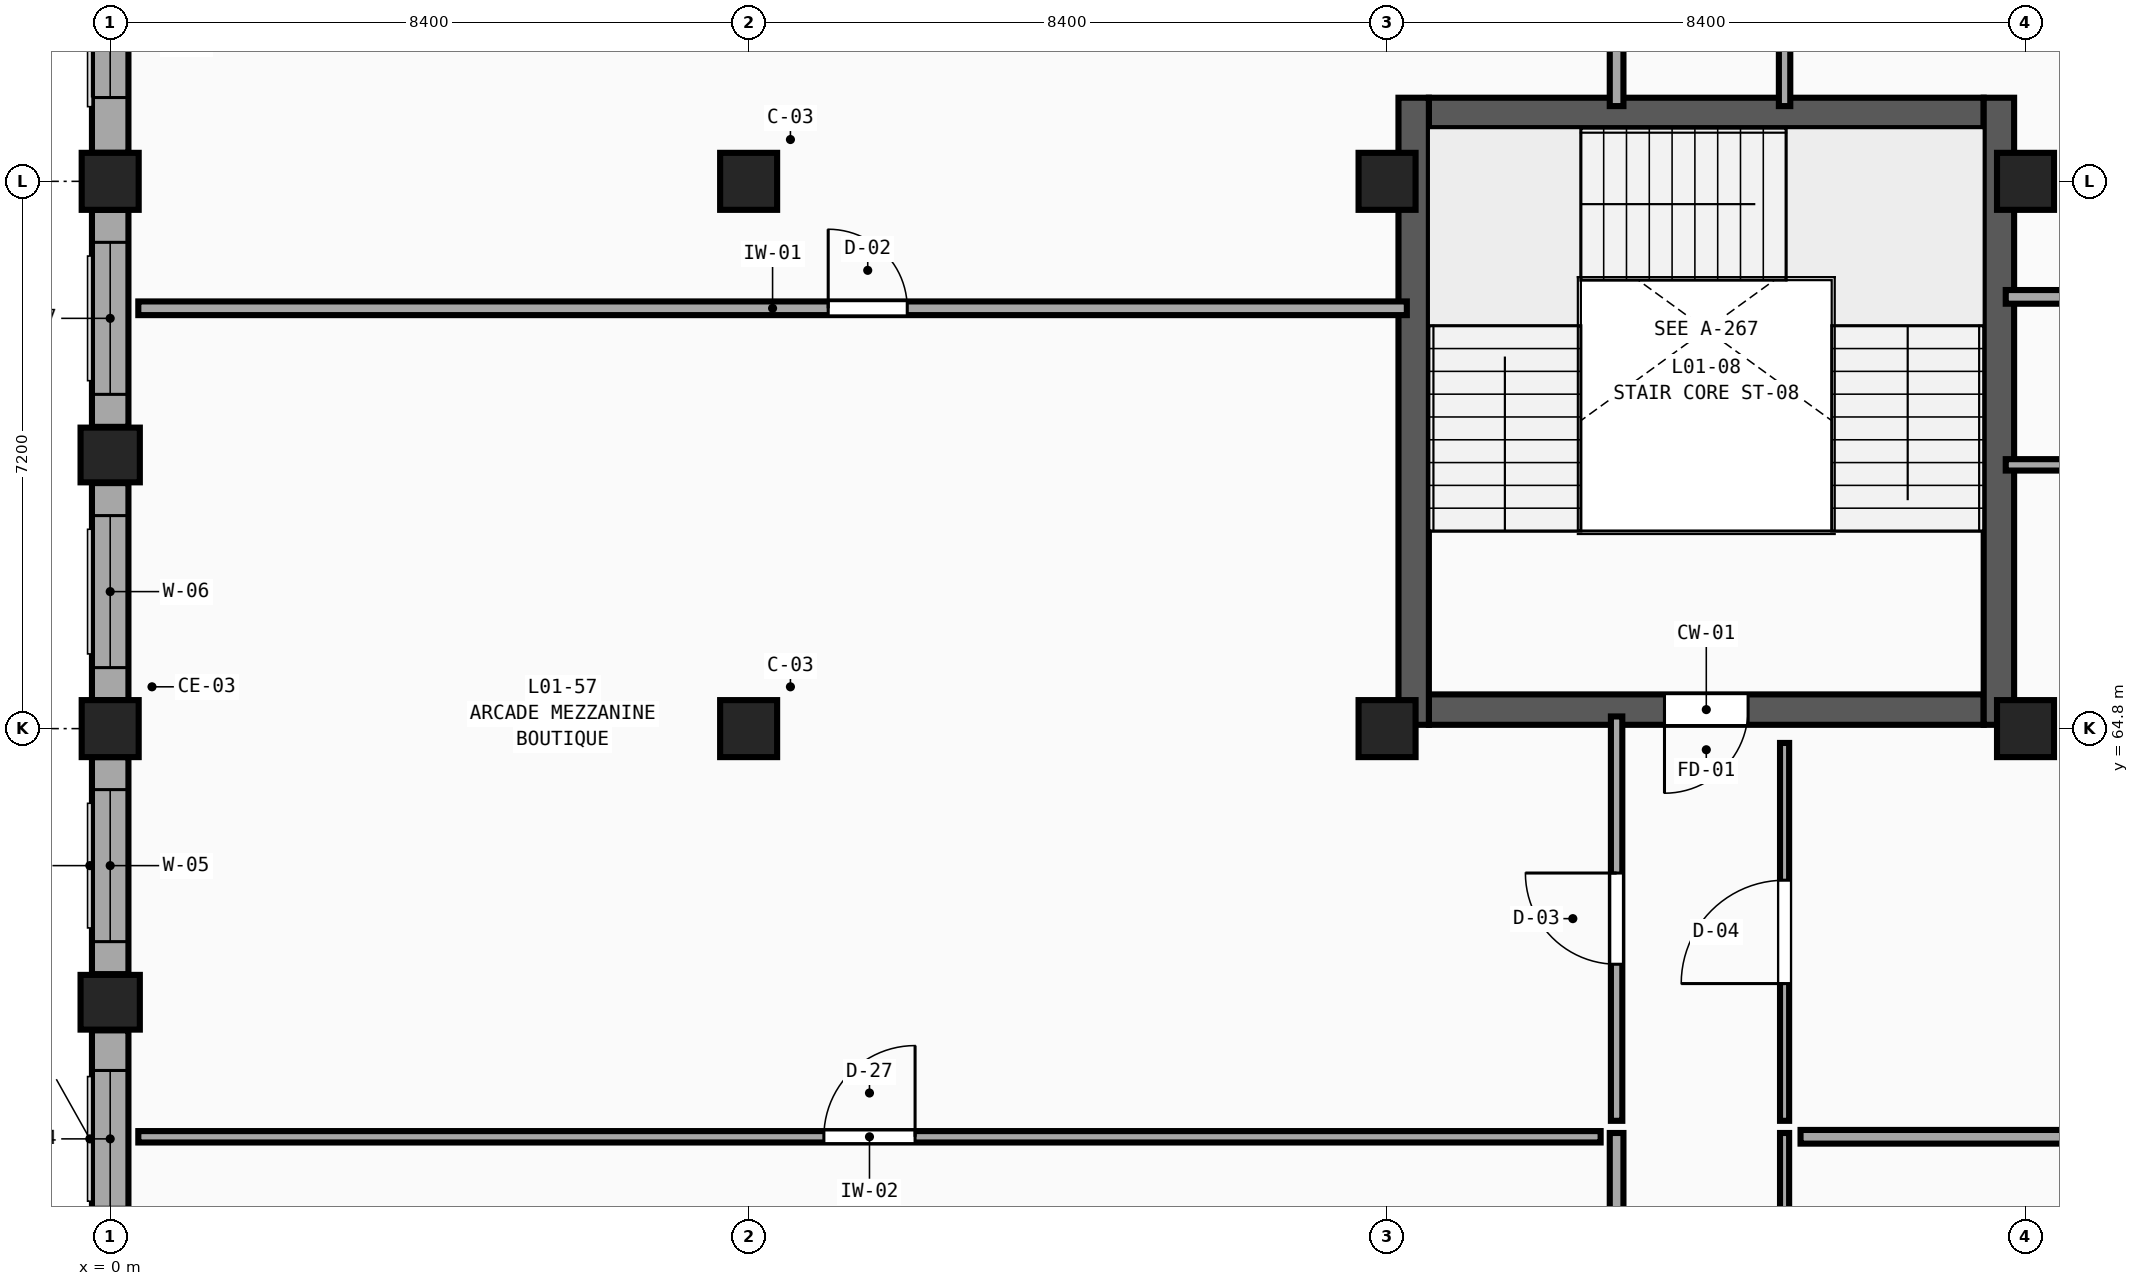
"""IFC4 building model, lengths in metres.
Left out: names, types, materials, properties, quantities, classifications, styles, units other than length and angle.
Written with IfcOpenShell. Run it as: python <this file> out.ifc"""

import sys

from ifc_helpers import new_model, si_unit, direction, frame, frame_2d, origin, origin_2d, place, context, subcontext, project, spatial, rectangle, extrude, element, fill, save


model = new_model("IFC4")
c1 = context("Model", 3, precision=1e-05, world=origin(), true_north=direction((0.0, 1.0)))
c2 = subcontext(c1, "Body", "Model", "MODEL_VIEW")
j1 = project(units=[si_unit("LENGTHUNIT", "METRE"), si_unit("PLANEANGLEUNIT", "RADIAN")], contexts=[c1])
p1 = place(None, origin())
s1 = spatial("IfcSite", under=j1, at=p1, CompositionType="ELEMENT")
p2 = place(p1, origin())
s2 = spatial("IfcBuilding", under=s1, at=p2, CompositionType="ELEMENT")
p3 = place(p2, frame((0.0, 0.0, 5.4)))
s3 = spatial("IfcBuildingStorey", under=s2, at=p3, CompositionType="ELEMENT", Elevation=5.4)
for number, where, z_axis, x_axis in (
    (1, (0.0, 64.8, 0.0), (0.0, 0.0, 1.0), (1.0, 0.0, 0.0)),
    (2, (0.0, 72.0, 0.0), (0.0, 0.0, 1.0), (1.0, 0.0, 0.0)),
    (3, (8.4, 64.8, 0.0), (0.0, 0.0, 1.0), (1.0, 0.0, 0.0)),
    (4, (8.4, 72.0, 0.0), (0.0, 0.0, 1.0), (1.0, 0.0, 0.0)),
    (5, (16.8, 64.8, 0.0), (0.0, 0.0, 1.0), (1.0, 0.0, 0.0)),
    (6, (16.8, 72.0, 0.0), (0.0, 0.0, 1.0), (1.0, 0.0, 0.0)),
    (7, (25.2, 64.8, 0.0), (0.0, 0.0, 1.0), (1.0, 0.0, 0.0)),
    (8, (25.2, 72.0, 0.0), (0.0, 0.0, 1.0), (1.0, 0.0, 0.0)),
):
    element("IfcColumn", number, at=place(p3, frame(where, z_axis=z_axis, x_axis=x_axis)), inside=s3, PredefinedType="COLUMN", context=c2, shape_type="SweptSolid", body=[
        extrude(rectangle(XDim=0.75, YDim=0.75, at=origin_2d()), origin(), (0.0, 0.0, 1.0), 4.5),
    ])
for number, where, z_axis, x_axis in (
    (9, (0.0, 61.2, 0.0), (0.0, 0.0, 1.0), (1.0, 0.0, 0.0)),
    (10, (0.0, 68.4, 0.0), (0.0, 0.0, 1.0), (1.0, 0.0, 0.0)),
):
    element("IfcColumn", number, at=place(p3, frame(where, z_axis=z_axis, x_axis=x_axis)), inside=s3, PredefinedType="PILASTER", context=c2, shape_type="SweptSolid", body=[
        extrude(rectangle(XDim=0.78, YDim=0.72, at=origin_2d()), origin(), (0.0, 0.0, 1.0), 4.5),
    ])
p4 = place(p3, frame((0.0, 57.975, 0.0), z_axis=(0.0, 0.0, 1.0), x_axis=(0.0, 1.0, 0.0)))
e11 = element("IfcWall", 11, at=p4, inside=s3, PredefinedType="SOLIDWALL", context=c2, shape_type="SweptSolid", body=[
    extrude(rectangle(XDim=2.855, YDim=0.48, at=frame_2d((1.427, 0.0))), origin(), (0.0, 0.0, 1.0), 3.63),
])
p5 = place(p4, frame((0.528, 0.0, 0.75)))
e12 = element("IfcOpeningElement", 12, at=p5, cuts=e11, PredefinedType="OPENING", context=c2, shape_type="SweptSolid", body=[
    extrude(rectangle(XDim=1.8, YDim=1.9, at=frame_2d((0.9, 0.95))), frame((0.0, 0.26, 0.0), z_axis=(0.0, -1.0, 0.0), x_axis=(1.0, 0.0, 0.0)), (0.0, 0.0, 1.0), 0.52),
])
p6 = place(p3, frame((0.0, 61.57, 0.0), z_axis=(0.0, 0.0, 1.0), x_axis=(0.0, 1.0, 0.0)))
e13 = element("IfcWall", 13, at=p6, inside=s3, PredefinedType="SOLIDWALL", context=c2, shape_type="SweptSolid", body=[
    extrude(rectangle(XDim=2.855, YDim=0.48, at=frame_2d((1.427, 0.0))), origin(), (0.0, 0.0, 1.0), 3.63),
])
p7 = place(p6, frame((0.427, 0.0, 0.75)))
e14 = element("IfcOpeningElement", 14, at=p7, cuts=e13, PredefinedType="OPENING", context=c2, shape_type="SweptSolid", body=[
    extrude(rectangle(XDim=2.0, YDim=1.9, at=frame_2d((1.0, 0.95))), frame((0.0, 0.26, 0.0), z_axis=(0.0, -1.0, 0.0), x_axis=(1.0, 0.0, 0.0)), (0.0, 0.0, 1.0), 0.52),
])
p8 = place(p3, frame((0.0, 65.175, 0.0), z_axis=(0.0, 0.0, 1.0), x_axis=(0.0, 1.0, 0.0)))
e15 = element("IfcWall", 15, at=p8, inside=s3, PredefinedType="SOLIDWALL", context=c2, shape_type="SweptSolid", body=[
    extrude(rectangle(XDim=2.855, YDim=0.48, at=frame_2d((1.427, 0.0))), origin(), (0.0, 0.0, 1.0), 3.63),
])
p9 = place(p8, frame((0.427, 0.0, 0.75)))
e16 = element("IfcOpeningElement", 16, at=p9, cuts=e15, PredefinedType="OPENING", context=c2, shape_type="SweptSolid", body=[
    extrude(rectangle(XDim=2.0, YDim=1.9, at=frame_2d((1.0, 0.95))), frame((0.0, 0.26, 0.0), z_axis=(0.0, -1.0, 0.0), x_axis=(1.0, 0.0, 0.0)), (0.0, 0.0, 1.0), 0.52),
])
p10 = place(p3, frame((0.0, 68.77, 0.0), z_axis=(0.0, 0.0, 1.0), x_axis=(0.0, 1.0, 0.0)))
e17 = element("IfcWall", 17, at=p10, inside=s3, PredefinedType="SOLIDWALL", context=c2, shape_type="SweptSolid", body=[
    extrude(rectangle(XDim=2.855, YDim=0.48, at=frame_2d((1.427, 0.0))), origin(), (0.0, 0.0, 1.0), 3.63),
])
p11 = place(p10, frame((0.427, 0.0, 0.75)))
e18 = element("IfcOpeningElement", 18, at=p11, cuts=e17, PredefinedType="OPENING", context=c2, shape_type="SweptSolid", body=[
    extrude(rectangle(XDim=2.0, YDim=1.9, at=frame_2d((1.0, 0.95))), frame((0.0, 0.26, 0.0), z_axis=(0.0, -1.0, 0.0), x_axis=(1.0, 0.0, 0.0)), (0.0, 0.0, 1.0), 0.52),
])
p12 = place(p3, frame((0.0, 72.375, 0.0), z_axis=(0.0, 0.0, 1.0), x_axis=(0.0, 1.0, 0.0)))
e19 = element("IfcWall", 19, at=p12, inside=s3, PredefinedType="SOLIDWALL", context=c2, shape_type="SweptSolid", body=[
    extrude(rectangle(XDim=2.855, YDim=0.48, at=frame_2d((1.427, 0.0))), origin(), (0.0, 0.0, 1.0), 3.63),
])
p13 = place(p12, frame((0.728, 0.0, 0.75)))
e20 = element("IfcOpeningElement", 20, at=p13, cuts=e19, PredefinedType="OPENING", context=c2, shape_type="SweptSolid", body=[
    extrude(rectangle(XDim=1.4, YDim=2.08, at=frame_2d((0.7, 1.04))), frame((0.0, 0.26, 0.0), z_axis=(0.0, -1.0, 0.0), x_axis=(1.0, 0.0, 0.0)), (0.0, 0.0, 1.0), 0.52),
])
p14 = place(p3, frame((24.65, 65.05, 0.0), z_axis=(0.0, 0.0, 1.0), x_axis=(-1.0, 0.0, 0.0)))
e21 = element("IfcWall", 21, at=p14, inside=s3, PredefinedType="SHEAR", context=c2, shape_type="SweptSolid", body=[
    extrude(rectangle(XDim=7.3, YDim=0.4, at=frame_2d((3.65, 0.0))), origin(), (0.0, 0.0, 1.0), 4.5),
])
p15 = place(p14, frame((3.1, 0.0, 0.0)))
e22 = element("IfcOpeningElement", 22, at=p15, cuts=e21, PredefinedType="OPENING", context=c2, shape_type="SweptSolid", body=[
    extrude(rectangle(XDim=1.1, YDim=2.2, at=frame_2d((0.55, 1.1))), frame((0.0, 0.22, 0.0), z_axis=(0.0, -1.0, 0.0), x_axis=(1.0, 0.0, 0.0)), (0.0, 0.0, 1.0), 0.44),
])
p16 = place(p3, frame((17.35, 72.9, 0.0), z_axis=(0.0, 0.0, 1.0), x_axis=(1.0, 0.0, 0.0)))
e23 = element("IfcWall", 23, at=p16, inside=s3, PredefinedType="SHEAR", context=c2, shape_type="SweptSolid", body=[
    extrude(rectangle(XDim=7.3, YDim=0.4, at=frame_2d((3.65, 0.0))), origin(), (0.0, 0.0, 1.0), 4.5),
])
for number, where, z_axis, x_axis in (
    (24, (17.15, 73.1, 0.0), (0.0, 0.0, 1.0), (0.0, -1.0, 0.0)),
    (25, (24.85, 64.85, 0.0), (0.0, 0.0, 1.0), (0.0, 1.0, 0.0)),
):
    element("IfcWall", number, at=place(p3, frame(where, z_axis=z_axis, x_axis=x_axis)), inside=s3, PredefinedType="SHEAR", context=c2, shape_type="SweptSolid", body=[
        extrude(rectangle(XDim=8.25, YDim=0.4, at=frame_2d((4.125, 0.0))), origin(), (0.0, 0.0, 1.0), 4.5),
    ])
p17 = place(p3, frame((0.37, 59.43, 0.0), z_axis=(0.0, 0.0, 1.0), x_axis=(1.0, 0.0, 0.0)))
e26 = element("IfcWall", 26, at=p17, inside=s3, PredefinedType="PARTITIONING", context=c2, shape_type="SweptSolid", body=[
    extrude(rectangle(XDim=19.24, YDim=0.15, at=frame_2d((9.62, 0.0))), origin(), (0.0, 0.0, 1.0), 4.18),
])
p18 = place(p17, frame((9.02, 0.0, 0.0)))
e27 = element("IfcOpeningElement", 27, at=p18, cuts=e26, PredefinedType="OPENING", context=c2, shape_type="SweptSolid", body=[
    extrude(rectangle(XDim=1.2, YDim=2.37, at=frame_2d((0.6, 1.185))), frame((0.0, 0.095, 0.0), z_axis=(0.0, -1.0, 0.0), x_axis=(1.0, 0.0, 0.0)), (0.0, 0.0, 1.0), 0.19),
])
p19 = place(p3, frame((0.37, 70.33, 0.0), z_axis=(0.0, 0.0, 1.0), x_axis=(1.0, 0.0, 0.0)))
e28 = element("IfcWall", 28, at=p19, inside=s3, PredefinedType="PARTITIONING", context=c2, shape_type="SweptSolid", body=[
    extrude(rectangle(XDim=16.69, YDim=0.18, at=frame_2d((8.345, 0.0))), origin(), (0.0, 0.0, 1.0), 4.18),
])
p20 = place(p19, frame((9.077, 0.0, 0.0)))
e29 = element("IfcOpeningElement", 29, at=p20, cuts=e28, PredefinedType="OPENING", context=c2, shape_type="SweptSolid", body=[
    extrude(rectangle(XDim=1.04, YDim=2.05, at=frame_2d((0.52, 1.025))), frame((0.0, 0.11, 0.0), z_axis=(0.0, -1.0, 0.0), x_axis=(1.0, 0.0, 0.0)), (0.0, 0.0, 1.0), 0.22),
])
p21 = place(p3, frame((19.82, 45.83, 0.0), z_axis=(0.0, 0.0, 1.0), x_axis=(0.0, 1.0, 0.0)))
e30 = element("IfcWall", 30, at=p21, inside=s3, PredefinedType="PARTITIONING", context=c2, shape_type="SweptSolid", body=[
    extrude(rectangle(XDim=13.65, YDim=0.18, at=frame_2d((6.825, 0.0))), origin(), (0.0, 0.0, 1.0), 4.18),
])
p22 = place(p21, frame((6.305, 0.0, 0.0)))
e31 = element("IfcOpeningElement", 31, at=p22, cuts=e30, PredefinedType="OPENING", context=c2, shape_type="SweptSolid", body=[
    extrude(rectangle(XDim=1.04, YDim=2.37, at=frame_2d((0.52, 1.185))), frame((0.0, 0.11, 0.0), z_axis=(0.0, -1.0, 0.0), x_axis=(1.0, 0.0, 0.0)), (0.0, 0.0, 1.0), 0.22),
])
p23 = place(p3, frame((22.03, 45.83, 0.0), z_axis=(0.0, 0.0, 1.0), x_axis=(0.0, 1.0, 0.0)))
e32 = element("IfcWall", 32, at=p23, inside=s3, PredefinedType="PARTITIONING", context=c2, shape_type="SweptSolid", body=[
    extrude(rectangle(XDim=13.65, YDim=0.12, at=frame_2d((6.825, 0.0))), origin(), (0.0, 0.0, 1.0), 4.18),
])
p24 = place(p23, frame((6.145, 0.0, 0.0)))
e33 = element("IfcOpeningElement", 33, at=p24, cuts=e32, PredefinedType="OPENING", context=c2, shape_type="SweptSolid", body=[
    extrude(rectangle(XDim=1.36, YDim=2.37, at=frame_2d((0.68, 1.185))), frame((0.0, 0.08, 0.0), z_axis=(0.0, -1.0, 0.0), x_axis=(1.0, 0.0, 0.0)), (0.0, 0.0, 1.0), 0.16),
])
p25 = place(p3, frame((19.82, 72.99, 0.0), z_axis=(0.0, 0.0, 1.0), x_axis=(0.0, 1.0, 0.0)))
e34 = element("IfcWall", 34, at=p25, inside=s3, PredefinedType="PARTITIONING", context=c2, shape_type="SweptSolid", body=[
    extrude(rectangle(XDim=11.68, YDim=0.18, at=frame_2d((5.84, 0.0))), origin(), (0.0, 0.0, 1.0), 4.18),
])
p26 = place(p25, frame((5.32, 0.0, 0.0)))
e35 = element("IfcOpeningElement", 35, at=p26, cuts=e34, PredefinedType="OPENING", context=c2, shape_type="SweptSolid", body=[
    extrude(rectangle(XDim=1.04, YDim=2.05, at=frame_2d((0.52, 1.025))), frame((0.0, 0.11, 0.0), z_axis=(0.0, -1.0, 0.0), x_axis=(1.0, 0.0, 0.0)), (0.0, 0.0, 1.0), 0.22),
])
p27 = place(p3, frame((22.03, 72.99, 0.0), z_axis=(0.0, 0.0, 1.0), x_axis=(0.0, 1.0, 0.0)))
e36 = element("IfcWall", 36, at=p27, inside=s3, PredefinedType="PARTITIONING", context=c2, shape_type="SweptSolid", body=[
    extrude(rectangle(XDim=11.68, YDim=0.15, at=frame_2d((5.84, 0.0))), origin(), (0.0, 0.0, 1.0), 4.18),
])
p28 = place(p27, frame((5.24, 0.0, 0.0)))
e37 = element("IfcOpeningElement", 37, at=p28, cuts=e36, PredefinedType="OPENING", context=c2, shape_type="SweptSolid", body=[
    extrude(rectangle(XDim=1.2, YDim=2.05, at=frame_2d((0.6, 1.025))), frame((0.0, 0.095, 0.0), z_axis=(0.0, -1.0, 0.0), x_axis=(1.0, 0.0, 0.0)), (0.0, 0.0, 1.0), 0.19),
])
p29 = place(p3, frame((24.94, 68.27, 0.0), z_axis=(0.0, 0.0, 1.0), x_axis=(1.0, 0.0, 0.0)))
e38 = element("IfcWall", 38, at=p29, inside=s3, PredefinedType="PARTITIONING", context=c2, shape_type="SweptSolid", body=[
    extrude(rectangle(XDim=11.63, YDim=0.15, at=frame_2d((5.815, 0.0))), origin(), (0.0, 0.0, 1.0), 4.18),
])
p30 = place(p29, frame((4.975, 0.0, 0.0)))
e39 = element("IfcOpeningElement", 39, at=p30, cuts=e38, PredefinedType="OPENING", context=c2, shape_type="SweptSolid", body=[
    extrude(rectangle(XDim=1.68, YDim=2.05, at=frame_2d((0.84, 1.025))), frame((0.0, 0.095, 0.0), z_axis=(0.0, -1.0, 0.0), x_axis=(1.0, 0.0, 0.0)), (0.0, 0.0, 1.0), 0.19),
])
p31 = place(p3, frame((24.94, 70.48, 0.0), z_axis=(0.0, 0.0, 1.0), x_axis=(1.0, 0.0, 0.0)))
e40 = element("IfcWall", 40, at=p31, inside=s3, PredefinedType="PARTITIONING", context=c2, shape_type="SweptSolid", body=[
    extrude(rectangle(XDim=11.47, YDim=0.18, at=frame_2d((5.735, 0.0))), origin(), (0.0, 0.0, 1.0), 4.18),
])
p32 = place(p31, frame((5.215, 0.0, 0.0)))
e41 = element("IfcOpeningElement", 41, at=p32, cuts=e40, PredefinedType="OPENING", context=c2, shape_type="SweptSolid", body=[
    extrude(rectangle(XDim=1.04, YDim=2.13, at=frame_2d((0.52, 1.065))), frame((0.0, 0.11, 0.0), z_axis=(0.0, -1.0, 0.0), x_axis=(1.0, 0.0, 0.0)), (0.0, 0.0, 1.0), 0.22),
])
p33 = place(p3, frame((19.82, 59.64, 0.0), z_axis=(0.0, 0.0, 1.0), x_axis=(0.0, 1.0, 0.0)))
e42 = element("IfcWall", 42, at=p33, inside=s3, PredefinedType="PARTITIONING", context=c2, shape_type="SweptSolid", body=[
    extrude(rectangle(XDim=5.32, YDim=0.15, at=frame_2d((2.66, 0.0))), origin(), (0.0, 0.0, 1.0), 4.18),
])
p34 = place(p33, frame((2.06, 0.0, 0.0)))
e43 = element("IfcOpeningElement", 43, at=p34, cuts=e42, PredefinedType="OPENING", context=c2, shape_type="SweptSolid", body=[
    extrude(rectangle(XDim=1.2, YDim=2.05, at=frame_2d((0.6, 1.025))), frame((0.0, 0.095, 0.0), z_axis=(0.0, -1.0, 0.0), x_axis=(1.0, 0.0, 0.0)), (0.0, 0.0, 1.0), 0.19),
])
p35 = place(p3, frame((22.03, 59.64, 0.0), z_axis=(0.0, 0.0, 1.0), x_axis=(0.0, 1.0, 0.0)))
e44 = element("IfcWall", 44, at=p35, inside=s3, PredefinedType="PARTITIONING", context=c2, shape_type="SweptSolid", body=[
    extrude(rectangle(XDim=4.971, YDim=0.12, at=frame_2d((2.486, 0.0))), origin(), (0.0, 0.0, 1.0), 4.18),
])
p36 = place(p35, frame((1.806, 0.0, 0.0)))
e45 = element("IfcOpeningElement", 45, at=p36, cuts=e44, PredefinedType="OPENING", context=c2, shape_type="SweptSolid", body=[
    extrude(rectangle(XDim=1.36, YDim=2.05, at=frame_2d((0.68, 1.025))), frame((0.0, 0.08, 0.0), z_axis=(0.0, -1.0, 0.0), x_axis=(1.0, 0.0, 0.0)), (0.0, 0.0, 1.0), 0.16),
])
p37 = place(p3, frame((22.24, 59.43, 0.0), z_axis=(0.0, 0.0, 1.0), x_axis=(1.0, 0.0, 0.0)))
e46 = element("IfcWall", 46, at=p37, inside=s3, PredefinedType="PARTITIONING", context=c2, shape_type="SweptSolid", body=[
    extrude(rectangle(XDim=14.17, YDim=0.18, at=frame_2d((7.085, 0.0))), origin(), (0.0, 0.0, 1.0), 4.18),
])
p38 = place(p5, origin())
e47 = element("IfcWindow", 47, at=p38, inside=s3, PartitioningType="DOUBLE_PANEL_VERTICAL", PredefinedType="WINDOW", context=c2, shape_type="SweptSolid", body=[
    extrude(rectangle(XDim=1.8, YDim=1.9, at=frame_2d((0.9, 0.95))), frame((0.0, 0.03, 0.0), z_axis=(0.0, -1.0, 0.0), x_axis=(1.0, 0.0, 0.0)), (0.0, 0.0, 1.0), 0.06),
])
fill(e12, e47)
p39 = place(p7, origin())
e48 = element("IfcWindow", 48, at=p39, inside=s3, PartitioningType="TRIPLE_PANEL_VERTICAL", PredefinedType="WINDOW", context=c2, shape_type="SweptSolid", body=[
    extrude(rectangle(XDim=2.0, YDim=1.9, at=frame_2d((1.0, 0.95))), frame((0.0, 0.03, 0.0), z_axis=(0.0, -1.0, 0.0), x_axis=(1.0, 0.0, 0.0)), (0.0, 0.0, 1.0), 0.06),
])
fill(e14, e48)
p40 = place(p9, origin())
e49 = element("IfcWindow", 49, at=p40, inside=s3, PartitioningType="TRIPLE_PANEL_VERTICAL", PredefinedType="WINDOW", context=c2, shape_type="SweptSolid", body=[
    extrude(rectangle(XDim=2.0, YDim=1.9, at=frame_2d((1.0, 0.95))), frame((0.0, 0.03, 0.0), z_axis=(0.0, -1.0, 0.0), x_axis=(1.0, 0.0, 0.0)), (0.0, 0.0, 1.0), 0.06),
])
fill(e16, e49)
p41 = place(p11, origin())
e50 = element("IfcWindow", 50, at=p41, inside=s3, PartitioningType="TRIPLE_PANEL_VERTICAL", PredefinedType="WINDOW", context=c2, shape_type="SweptSolid", body=[
    extrude(rectangle(XDim=2.0, YDim=1.9, at=frame_2d((1.0, 0.95))), frame((0.0, 0.03, 0.0), z_axis=(0.0, -1.0, 0.0), x_axis=(1.0, 0.0, 0.0)), (0.0, 0.0, 1.0), 0.06),
])
fill(e18, e50)
p42 = place(p13, origin())
e51 = element("IfcWindow", 51, at=p42, inside=s3, PartitioningType="DOUBLE_PANEL_VERTICAL", PredefinedType="WINDOW", context=c2, shape_type="SweptSolid", body=[
    extrude(rectangle(XDim=1.4, YDim=2.08, at=frame_2d((0.7, 1.04))), frame((0.0, 0.03, 0.0), z_axis=(0.0, -1.0, 0.0), x_axis=(1.0, 0.0, 0.0)), (0.0, 0.0, 1.0), 0.06),
])
fill(e20, e51)
p43 = place(p15, origin())
e52 = element("IfcDoor", 52, at=p43, inside=s3, OperationType="SINGLE_SWING_RIGHT", PredefinedType="DOOR", context=c2, shape_type="SweptSolid", body=[
    extrude(rectangle(XDim=1.1, YDim=2.2, at=frame_2d((0.55, 1.1))), frame((0.0, 0.025, 0.0), z_axis=(0.0, -1.0, 0.0), x_axis=(1.0, 0.0, 0.0)), (0.0, 0.0, 1.0), 0.05),
])
fill(e22, e52)
p44 = place(p18, origin())
e53 = element("IfcDoor", 53, at=p44, inside=s3, OperationType="SINGLE_SWING_RIGHT", PredefinedType="DOOR", context=c2, shape_type="SweptSolid", body=[
    extrude(rectangle(XDim=1.2, YDim=2.37, at=frame_2d((0.6, 1.185))), frame((0.0, 0.025, 0.0), z_axis=(0.0, -1.0, 0.0), x_axis=(1.0, 0.0, 0.0)), (0.0, 0.0, 1.0), 0.05),
])
fill(e27, e53)
p45 = place(p20, origin())
e54 = element("IfcDoor", 54, at=p45, inside=s3, OperationType="SINGLE_SWING_LEFT", PredefinedType="DOOR", context=c2, shape_type="SweptSolid", body=[
    extrude(rectangle(XDim=1.04, YDim=2.05, at=frame_2d((0.52, 1.025))), frame((0.0, 0.025, 0.0), z_axis=(0.0, -1.0, 0.0), x_axis=(1.0, 0.0, 0.0)), (0.0, 0.0, 1.0), 0.05),
])
fill(e29, e54)
p46 = place(p34, origin())
e55 = element("IfcDoor", 55, at=p46, inside=s3, OperationType="SINGLE_SWING_RIGHT", PredefinedType="DOOR", context=c2, shape_type="SweptSolid", body=[
    extrude(rectangle(XDim=1.2, YDim=2.05, at=frame_2d((0.6, 1.025))), frame((0.0, 0.025, 0.0), z_axis=(0.0, -1.0, 0.0), x_axis=(1.0, 0.0, 0.0)), (0.0, 0.0, 1.0), 0.05),
])
fill(e43, e55)
p47 = place(p36, origin())
e56 = element("IfcDoor", 56, at=p47, inside=s3, OperationType="SINGLE_SWING_LEFT", PredefinedType="DOOR", context=c2, shape_type="SweptSolid", body=[
    extrude(rectangle(XDim=1.36, YDim=2.05, at=frame_2d((0.68, 1.025))), frame((0.0, 0.025, 0.0), z_axis=(0.0, -1.0, 0.0), x_axis=(1.0, 0.0, 0.0)), (0.0, 0.0, 1.0), 0.05),
])
fill(e45, e56)
save(model, sys.argv[1])
